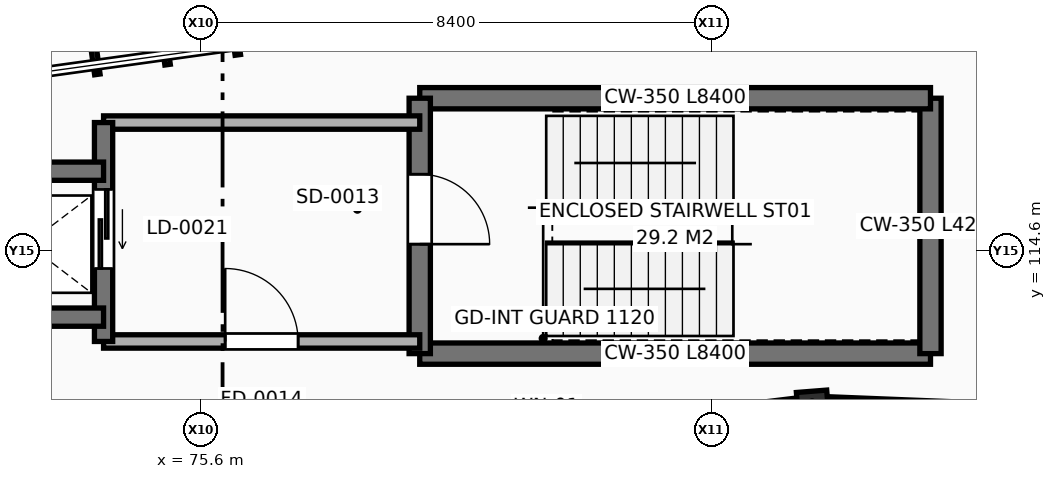
"""IFC4 building model, lengths in metres.
Left out: names, types, materials, properties, quantities, classifications, styles, units other than length and angle.
Written with IfcOpenShell. Run it as: python <this file> out.ifc"""

import sys

from ifc_helpers import new_model, si_unit, direction, frame, frame_2d, origin, origin_2d, place, context, subcontext, project, spatial, rectangle, extrude, element, fill, save


model = new_model("IFC4")
c1 = context("Model", 3, precision=1e-05, world=origin(), true_north=direction((0.0, 1.0)))
c2 = subcontext(c1, "Body", "Model", "MODEL_VIEW")
j1 = project(units=[si_unit("LENGTHUNIT", "METRE"), si_unit("PLANEANGLEUNIT", "RADIAN")], contexts=[c1])
p1 = place(None, origin())
s1 = spatial("IfcSite", under=j1, at=p1, CompositionType="ELEMENT")
p2 = place(p1, origin())
s2 = spatial("IfcBuilding", under=s1, at=p2, CompositionType="ELEMENT")
p3 = place(p2, frame((0.0, 0.0, 26.4)))
s3 = spatial("IfcBuildingStorey", under=s2, at=p3, CompositionType="ELEMENT", Elevation=26.4)
p4 = place(p3, frame((85.664, 112.031, 0.0), z_axis=(0.0, 0.0, 1.0), x_axis=(-0.078459095728, 0.996917333733, 0.0)))
e1 = element("IfcColumn", 1, at=p4, inside=s3, PredefinedType="COLUMN", context=c2, shape_type="SweptSolid", body=[
    extrude(rectangle(XDim=0.5, YDim=0.5, at=origin_2d()), origin(), (0.0, 0.0, 1.0), 4.2),
])
p5 = place(p3, frame((99.029, 111.496, 0.0), z_axis=(0.0, 0.0, 1.0), x_axis=(-0.999198007922, 0.040041740285, 0.0)))
e2 = element("IfcWall", 2, at=p5, inside=s3, PredefinedType="SOLIDWALL", context=c2, shape_type="SweptSolid", body=[
    extrude(rectangle(XDim=13.097, YDim=0.34, at=frame_2d((6.548, 0.0))), origin(), (0.0, 0.0, 1.0), 3.463),
])
p6 = place(p5, frame((3.566, 0.0, 0.9)))
e3 = element("IfcOpeningElement", 3, at=p6, cuts=e2, PredefinedType="OPENING", context=c2, shape_type="SweptSolid", body=[
    extrude(rectangle(XDim=1.2, YDim=2.1, at=frame_2d((0.6, 1.05))), frame((0.0, 0.18, 0.0), z_axis=(0.0, -1.0, 0.0), x_axis=(1.0, 0.0, 0.0)), (0.0, 0.0, 1.0), 0.36),
])
p7 = place(p5, frame((8.331, 0.0, 0.9)))
e4 = element("IfcOpeningElement", 4, at=p7, cuts=e2, PredefinedType="OPENING", context=c2, shape_type="SweptSolid", body=[
    extrude(rectangle(XDim=1.2, YDim=2.1, at=frame_2d((0.6, 1.05))), frame((0.0, 0.18, 0.0), z_axis=(0.0, -1.0, 0.0), x_axis=(1.0, 0.0, 0.0)), (0.0, 0.0, 1.0), 0.36),
])
p8 = place(p3, frame((85.403, 112.0, 0.0), z_axis=(0.0, 0.0, 1.0), x_axis=(-0.992612043569, -0.121331492044, 0.0)))
e5 = element("IfcWall", 5, at=p8, inside=s3, PredefinedType="SOLIDWALL", context=c2, shape_type="SweptSolid", body=[
    extrude(rectangle(XDim=12.852, YDim=0.34, at=frame_2d((6.426, 0.0))), origin(), (0.0, 0.0, 1.0), 3.463),
])
p9 = place(p8, frame((3.484, 0.0, 0.9)))
e6 = element("IfcOpeningElement", 6, at=p9, cuts=e5, PredefinedType="OPENING", context=c2, shape_type="SweptSolid", body=[
    extrude(rectangle(XDim=1.2, YDim=2.1, at=frame_2d((0.6, 1.05))), frame((0.0, 0.18, 0.0), z_axis=(0.0, -1.0, 0.0), x_axis=(1.0, 0.0, 0.0)), (0.0, 0.0, 1.0), 0.36),
])
p10 = place(p8, frame((8.168, 0.0, 0.9)))
e7 = element("IfcOpeningElement", 7, at=p10, cuts=e5, PredefinedType="OPENING", context=c2, shape_type="SweptSolid", body=[
    extrude(rectangle(XDim=1.2, YDim=2.1, at=frame_2d((0.6, 1.05))), frame((0.0, 0.18, 0.0), z_axis=(0.0, -1.0, 0.0), x_axis=(1.0, 0.0, 0.0)), (0.0, 0.0, 1.0), 0.36),
])
p11 = place(p3, frame((79.2, 112.9, 0.0), z_axis=(0.0, 0.0, 1.0), x_axis=(1.0, 0.0, 0.0)))
e8 = element("IfcWall", 8, at=p11, inside=s3, PredefinedType="SHEAR", context=c2, shape_type="SweptSolid", body=[
    extrude(rectangle(XDim=8.4, YDim=0.35, at=frame_2d((4.2, 0.0))), origin(), (0.0, 0.0, 1.0), 3.92),
])
p12 = place(p3, frame((87.6, 112.9, 0.0), z_axis=(0.0, 0.0, 1.0), x_axis=(0.0, 1.0, 0.0)))
e9 = element("IfcWall", 9, at=p12, inside=s3, PredefinedType="SHEAR", context=c2, shape_type="SweptSolid", body=[
    extrude(rectangle(XDim=4.2, YDim=0.35, at=frame_2d((2.1, 0.0))), origin(), (0.0, 0.0, 1.0), 3.92),
])
p13 = place(p3, frame((87.6, 117.1, 0.0), z_axis=(0.0, 0.0, 1.0), x_axis=(-1.0, 0.0, 0.0)))
e10 = element("IfcWall", 10, at=p13, inside=s3, PredefinedType="SHEAR", context=c2, shape_type="SweptSolid", body=[
    extrude(rectangle(XDim=8.4, YDim=0.35, at=frame_2d((4.2, 0.0))), origin(), (0.0, 0.0, 1.0), 3.92),
])
p14 = place(p3, frame((79.2, 117.1, 0.0), z_axis=(0.0, 0.0, 1.0), x_axis=(0.0, -1.0, 0.0)))
e11 = element("IfcWall", 11, at=p14, inside=s3, PredefinedType="SHEAR", context=c2, shape_type="SweptSolid", body=[
    extrude(rectangle(XDim=4.2, YDim=0.35, at=frame_2d((2.1, 0.0))), origin(), (0.0, 0.0, 1.0), 3.92),
])
p15 = place(p14, frame((1.25, 0.0, 0.0)))
e12 = element("IfcOpeningElement", 12, at=p15, cuts=e11, PredefinedType="OPENING", context=c2, shape_type="SweptSolid", body=[
    extrude(rectangle(XDim=1.15, YDim=2.2, at=frame_2d((0.575, 1.1))), frame((0.0, 0.185, 0.0), z_axis=(0.0, -1.0, 0.0), x_axis=(1.0, 0.0, 0.0)), (0.0, 0.0, 1.0), 0.37),
])
p16 = place(p3, frame((74.0, 113.1, 0.0), z_axis=(0.0, 0.0, 1.0), x_axis=(1.0, 0.0, 0.0)))
e13 = element("IfcWall", 13, at=p16, inside=s3, PredefinedType="SOLIDWALL", context=c2, shape_type="SweptSolid", body=[
    extrude(rectangle(XDim=5.2, YDim=0.22, at=frame_2d((2.6, 0.0))), origin(), (0.0, 0.0, 1.0), 3.92),
])
p17 = place(p16, frame((2.0, 0.0, 0.0)))
e14 = element("IfcOpeningElement", 14, at=p17, cuts=e13, PredefinedType="OPENING", context=c2, shape_type="SweptSolid", body=[
    extrude(rectangle(XDim=1.2, YDim=2.2, at=frame_2d((0.6, 1.1))), frame((0.0, 0.12, 0.0), z_axis=(0.0, -1.0, 0.0), x_axis=(1.0, 0.0, 0.0)), (0.0, 0.0, 1.0), 0.24),
])
p18 = place(p3, frame((79.2, 116.7, 0.0), z_axis=(0.0, 0.0, 1.0), x_axis=(-1.0, 0.0, 0.0)))
e15 = element("IfcWall", 15, at=p18, inside=s3, PredefinedType="SOLIDWALL", context=c2, shape_type="SweptSolid", body=[
    extrude(rectangle(XDim=5.2, YDim=0.22, at=frame_2d((2.6, 0.0))), origin(), (0.0, 0.0, 1.0), 3.92),
])
p19 = place(p3, frame((74.0, 116.7, 0.0), z_axis=(0.0, 0.0, 1.0), x_axis=(0.0, -1.0, 0.0)))
e16 = element("IfcWall", 16, at=p19, inside=s3, PredefinedType="SHEAR", context=c2, shape_type="SweptSolid", body=[
    extrude(rectangle(XDim=3.6, YDim=0.3, at=frame_2d((1.8, 0.0))), origin(), (0.0, 0.0, 1.0), 3.92),
])
p20 = place(p19, frame((1.1, 0.0, 0.0)))
e17 = element("IfcOpeningElement", 17, at=p20, cuts=e16, PredefinedType="OPENING", context=c2, shape_type="SweptSolid", body=[
    extrude(rectangle(XDim=1.3, YDim=2.3, at=frame_2d((0.65, 1.15))), frame((0.0, 0.16, 0.0), z_axis=(0.0, -1.0, 0.0), x_axis=(1.0, 0.0, 0.0)), (0.0, 0.0, 1.0), 0.32),
])
for number, where, z_axis, x_axis in (
    (18, (74.0, 115.9, 0.0), (0.0, 0.0, 1.0), (-1.0, 0.0, 0.0)),
    (19, (71.5, 113.5, 0.0), (0.0, 0.0, 1.0), (1.0, 0.0, 0.0)),
):
    element("IfcWall", number, at=place(p3, frame(where, z_axis=z_axis, x_axis=x_axis)), inside=s3, PredefinedType="SHEAR", context=c2, shape_type="SweptSolid", body=[
        extrude(rectangle(XDim=2.5, YDim=0.3, at=frame_2d((1.25, 0.0))), origin(), (0.0, 0.0, 1.0), 3.92),
    ])
p21 = place(p15, origin())
e20 = element("IfcDoor", 20, at=p21, inside=s3, OperationType="SINGLE_SWING_RIGHT", PredefinedType="DOOR", context=c2, shape_type="SweptSolid", body=[
    extrude(rectangle(XDim=1.15, YDim=2.2, at=frame_2d((0.575, 1.1))), frame((0.0, 0.025, 0.0), z_axis=(0.0, -1.0, 0.0), x_axis=(1.0, 0.0, 0.0)), (0.0, 0.0, 1.0), 0.05),
])
fill(e12, e20)
p22 = place(p17, origin())
e21 = element("IfcDoor", 21, at=p22, inside=s3, OperationType="SINGLE_SWING_LEFT", PredefinedType="DOOR", context=c2, shape_type="SweptSolid", body=[
    extrude(rectangle(XDim=1.2, YDim=2.2, at=frame_2d((0.6, 1.1))), frame((0.0, 0.025, 0.0), z_axis=(0.0, -1.0, 0.0), x_axis=(1.0, 0.0, 0.0)), (0.0, 0.0, 1.0), 0.05),
])
fill(e14, e21)
p23 = place(p20, origin())
e22 = element("IfcDoor", 22, at=p23, inside=s3, OperationType="SLIDING_TO_LEFT", PredefinedType="DOOR", context=c2, shape_type="SweptSolid", body=[
    extrude(rectangle(XDim=1.3, YDim=2.3, at=frame_2d((0.65, 1.15))), frame((0.0, 0.025, 0.0), z_axis=(0.0, -1.0, 0.0), x_axis=(1.0, 0.0, 0.0)), (0.0, 0.0, 1.0), 0.05),
])
fill(e17, e22)
save(model, sys.argv[1])
